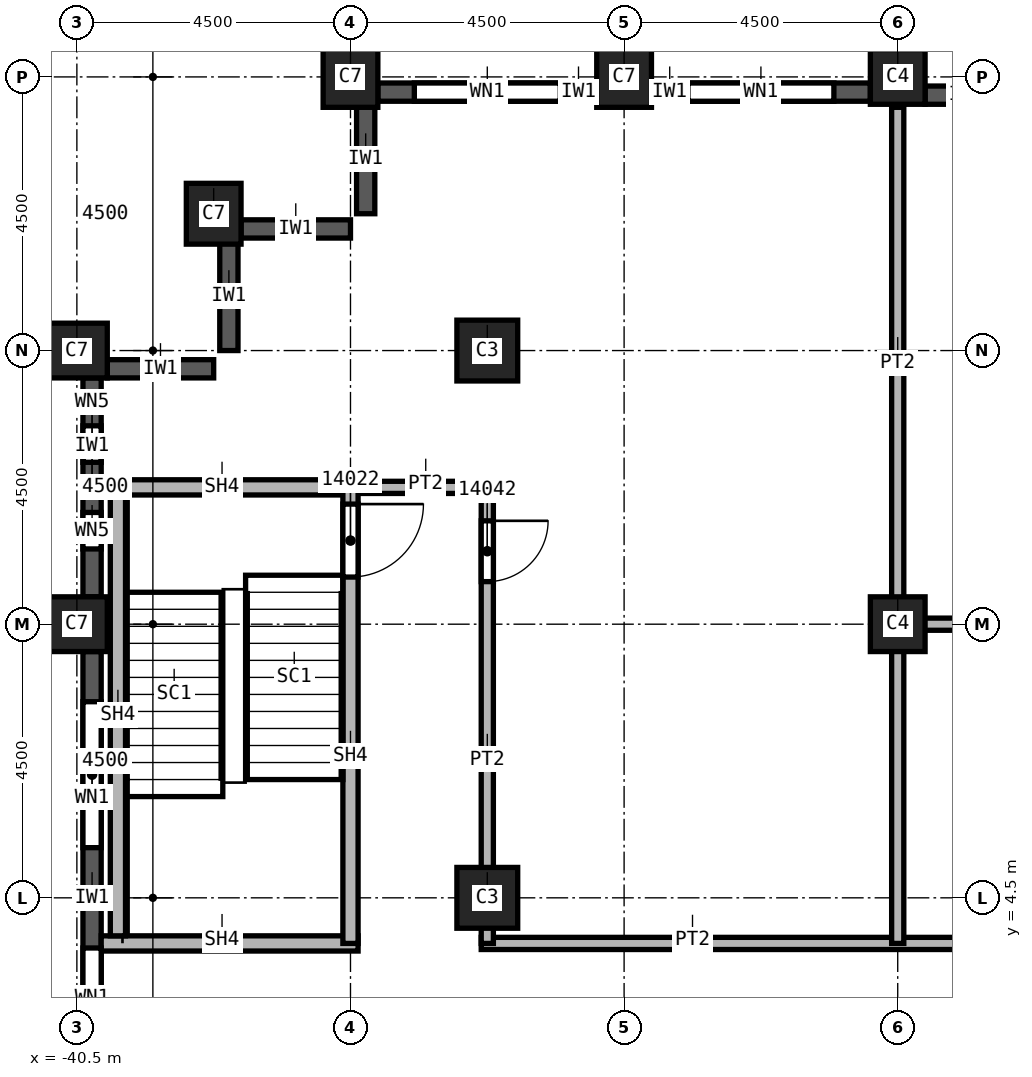
"""IFC4 building model, lengths in metres.
Left out: names, types, materials, properties, quantities, classifications, styles, units other than length and angle.
Written with IfcOpenShell. Run it as: python <this file> out.ifc"""

import sys

from ifc_helpers import new_model, si_unit, direction, frame, frame_2d, origin, origin_2d, place, context, subcontext, project, spatial, rectangle, extrude, element, fill, save


model = new_model("IFC4")
c1 = context("Model", 3, precision=1e-05, world=origin(), true_north=direction((0.0, 1.0)))
c2 = subcontext(c1, "Body", "Model", "MODEL_VIEW")
j1 = project(units=[si_unit("LENGTHUNIT", "METRE"), si_unit("PLANEANGLEUNIT", "RADIAN")], contexts=[c1])
p1 = place(None, origin())
s1 = spatial("IfcSite", under=j1, at=p1, CompositionType="ELEMENT")
p2 = place(p1, origin())
s2 = spatial("IfcBuilding", under=s1, at=p2, CompositionType="ELEMENT")
p3 = place(p2, frame((0.0, 0.0, 224.0)))
s3 = spatial("IfcBuildingStorey", under=s2, at=p3, CompositionType="ELEMENT", Elevation=224.0)
for number, where, z_axis, x_axis in (
    (1, (-40.5, 9.0, 0.0), (0.0, 0.0, 1.0), (0.0, 1.0, 0.0)),
    (2, (-40.5, 13.5, 0.0), (0.0, 0.0, 1.0), (0.0, 1.0, 0.0)),
    (3, (-38.25, 15.75, 0.0), (0.0, 0.0, 1.0), (1.0, 0.0, 0.0)),
    (4, (-31.5, 18.0, 0.0), (0.0, 0.0, 1.0), (1.0, 0.0, 0.0)),
    (5, (-36.0, 18.0, 0.0), (0.0, 0.0, 1.0), (1.0, 0.0, 0.0)),
):
    element("IfcColumn", number, at=place(p3, frame(where, z_axis=z_axis, x_axis=x_axis)), inside=s3, PredefinedType="COLUMN", context=c2, shape_type="SweptSolid", body=[
        extrude(rectangle(XDim=0.9, YDim=1.0, at=origin_2d()), origin(), (0.0, 0.0, 1.0), 3.72),
    ])
for number, where, z_axis, x_axis in (
    (6, (-33.75, 4.5, 0.0), (0.0, 0.0, 1.0), (1.0, 0.0, 0.0)),
    (7, (-33.75, 13.5, 0.0), (0.0, 0.0, 1.0), (1.0, 0.0, 0.0)),
):
    element("IfcColumn", number, at=place(p3, frame(where, z_axis=z_axis, x_axis=x_axis)), inside=s3, PredefinedType="COLUMN", context=c2, shape_type="SweptSolid", body=[
        extrude(rectangle(XDim=1.0, YDim=1.0, at=origin_2d()), origin(), (0.0, 0.0, 1.0), 3.72),
    ])
for number, where, z_axis, x_axis in (
    (8, (-27.0, 9.0, 0.0), (0.0, 0.0, 1.0), (1.0, 0.0, 0.0)),
    (9, (-27.0, 18.0, 0.0), (0.0, 0.0, 1.0), (1.0, 0.0, 0.0)),
):
    element("IfcColumn", number, at=place(p3, frame(where, z_axis=z_axis, x_axis=x_axis)), inside=s3, PredefinedType="COLUMN", context=c2, shape_type="SweptSolid", body=[
        extrude(rectangle(XDim=0.9, YDim=0.9, at=origin_2d()), origin(), (0.0, 0.0, 1.0), 3.72),
    ])
for number, where, z_axis, x_axis in (
    (10, (-35.75, 17.55, 0.0), (0.0, 0.0, 1.0), (0.0, -1.0, 0.0)),
    (11, (-37.8, 15.5, 0.0), (0.0, 0.0, 1.0), (1.0, 0.0, 0.0)),
    (12, (-38.0, 15.3, 0.0), (0.0, 0.0, 1.0), (0.0, -1.0, 0.0)),
):
    element("IfcWall", number, at=place(p3, frame(where, z_axis=z_axis, x_axis=x_axis)), inside=s3, PredefinedType="SOLIDWALL", context=c2, shape_type="SweptSolid", body=[
        extrude(rectangle(XDim=1.8, YDim=0.3, at=frame_2d((0.9, 0.0))), origin(), (0.0, 0.0, 1.0), 3.12),
    ])
p4 = place(p3, frame((-40.0, 13.2, 0.0), z_axis=(0.0, 0.0, 1.0), x_axis=(1.0, 0.0, 0.0)))
e13 = element("IfcWall", 13, at=p4, inside=s3, PredefinedType="SOLIDWALL", context=c2, shape_type="SweptSolid", body=[
    extrude(rectangle(XDim=1.75, YDim=0.3, at=frame_2d((0.875, 0.0))), origin(), (0.0, 0.0, 1.0), 3.12),
])
p5 = place(p3, frame((-25.2, 17.7, 0.0), z_axis=(0.0, 0.0, 1.0), x_axis=(-1.0, 0.0, 0.0)))
e14 = element("IfcWall", 14, at=p5, inside=s3, PredefinedType="SOLIDWALL", context=c2, shape_type="SweptSolid", body=[
    extrude(rectangle(XDim=1.35, YDim=0.3, at=frame_2d((0.675, 0.0))), origin(), (0.0, 0.0, 1.0), 3.12),
])
p6 = place(p3, frame((-27.45, 17.75, 0.0), z_axis=(0.0, 0.0, 1.0), x_axis=(-1.0, 0.0, 0.0)))
e15 = element("IfcWall", 15, at=p6, inside=s3, PredefinedType="SOLIDWALL", context=c2, shape_type="SweptSolid", body=[
    extrude(rectangle(XDim=3.6, YDim=0.3, at=frame_2d((1.8, 0.0))), origin(), (0.0, 0.0, 1.0), 3.12),
])
p7 = place(p6, frame((0.6, 0.0, 0.8)))
e16 = element("IfcOpeningElement", 16, at=p7, cuts=e15, PredefinedType="OPENING", context=c2, shape_type="SweptSolid", body=[
    extrude(rectangle(XDim=2.4, YDim=1.95, at=frame_2d((1.2, 0.975))), frame((0.0, 0.15, 0.0), z_axis=(0.0, -1.0, 0.0), x_axis=(1.0, 0.0, 0.0)), (0.0, 0.0, 1.0), 0.3),
])
p8 = place(p3, frame((-31.95, 17.75, 0.0), z_axis=(0.0, 0.0, 1.0), x_axis=(-1.0, 0.0, 0.0)))
e17 = element("IfcWall", 17, at=p8, inside=s3, PredefinedType="SOLIDWALL", context=c2, shape_type="SweptSolid", body=[
    extrude(rectangle(XDim=3.6, YDim=0.3, at=frame_2d((1.8, 0.0))), origin(), (0.0, 0.0, 1.0), 3.12),
])
p9 = place(p8, frame((0.6, 0.0, 0.8)))
e18 = element("IfcOpeningElement", 18, at=p9, cuts=e17, PredefinedType="OPENING", context=c2, shape_type="SweptSolid", body=[
    extrude(rectangle(XDim=2.4, YDim=1.95, at=frame_2d((1.2, 0.975))), frame((0.0, 0.15, 0.0), z_axis=(0.0, -1.0, 0.0), x_axis=(1.0, 0.0, 0.0)), (0.0, 0.0, 1.0), 0.3),
])
p10 = place(p3, frame((-40.25, 13.05, 0.0), z_axis=(0.0, 0.0, 1.0), x_axis=(0.0, -1.0, 0.0)))
e19 = element("IfcWall", 19, at=p10, inside=s3, PredefinedType="SOLIDWALL", context=c2, shape_type="SweptSolid", body=[
    extrude(rectangle(XDim=3.6, YDim=0.3, at=frame_2d((1.8, 0.0))), origin(), (0.0, 0.0, 1.0), 3.12),
])
p11 = place(p10, frame((0.788, 0.0, 0.8)))
e20 = element("IfcOpeningElement", 20, at=p11, cuts=e19, PredefinedType="OPENING", context=c2, shape_type="SweptSolid", body=[
    extrude(rectangle(XDim=0.6, YDim=1.95, at=frame_2d((0.3, 0.975))), frame((0.0, 0.15, 0.0), z_axis=(0.0, -1.0, 0.0), x_axis=(1.0, 0.0, 0.0)), (0.0, 0.0, 1.0), 0.3),
])
p12 = place(p10, frame((2.212, 0.0, 0.8)))
e21 = element("IfcOpeningElement", 21, at=p12, cuts=e19, PredefinedType="OPENING", context=c2, shape_type="SweptSolid", body=[
    extrude(rectangle(XDim=0.6, YDim=1.95, at=frame_2d((0.3, 0.975))), frame((0.0, 0.15, 0.0), z_axis=(0.0, -1.0, 0.0), x_axis=(1.0, 0.0, 0.0)), (0.0, 0.0, 1.0), 0.3),
])
p13 = place(p3, frame((-40.25, 8.55, 0.0), z_axis=(0.0, 0.0, 1.0), x_axis=(0.0, -1.0, 0.0)))
e22 = element("IfcWall", 22, at=p13, inside=s3, PredefinedType="SOLIDWALL", context=c2, shape_type="SweptSolid", body=[
    extrude(rectangle(XDim=8.1, YDim=0.3, at=frame_2d((4.05, 0.0))), origin(), (0.0, 0.0, 1.0), 3.12),
])
p14 = place(p13, frame((0.825, 0.0, 0.8)))
e23 = element("IfcOpeningElement", 23, at=p14, cuts=e22, PredefinedType="OPENING", context=c2, shape_type="SweptSolid", body=[
    extrude(rectangle(XDim=2.4, YDim=1.95, at=frame_2d((1.2, 0.975))), frame((0.0, 0.15, 0.0), z_axis=(0.0, -1.0, 0.0), x_axis=(1.0, 0.0, 0.0)), (0.0, 0.0, 1.0), 0.3),
])
p15 = place(p13, frame((4.875, 0.0, 0.8)))
e24 = element("IfcOpeningElement", 24, at=p15, cuts=e22, PredefinedType="OPENING", context=c2, shape_type="SweptSolid", body=[
    extrude(rectangle(XDim=2.4, YDim=1.95, at=frame_2d((1.2, 0.975))), frame((0.0, 0.15, 0.0), z_axis=(0.0, -1.0, 0.0), x_axis=(1.0, 0.0, 0.0)), (0.0, 0.0, 1.0), 0.3),
])
p16 = place(p3, frame((-36.0, 11.25, 0.0), z_axis=(0.0, 0.0, 1.0), x_axis=(1.0, 0.0, 0.0)))
e25 = element("IfcWall", 25, at=p16, inside=s3, PredefinedType="PARTITIONING", context=c2, shape_type="SweptSolid", body=[
    extrude(rectangle(XDim=2.35, YDim=0.2, at=frame_2d((1.175, 0.0))), origin(), (0.0, 0.0, 1.0), 3.72),
])
p17 = place(p3, frame((-33.85, 3.75, 0.0), z_axis=(0.0, 0.0, 1.0), x_axis=(1.0, 0.0, 0.0)))
e26 = element("IfcWall", 26, at=p17, inside=s3, PredefinedType="PARTITIONING", context=c2, shape_type="SweptSolid", body=[
    extrude(rectangle(XDim=13.95, YDim=0.2, at=frame_2d((6.975, 0.0))), origin(), (0.0, 0.0, 1.0), 3.72),
])
p18 = place(p17, frame((9.85, 0.0, 0.0)))
e27 = element("IfcOpeningElement", 27, at=p18, cuts=e26, PredefinedType="OPENING", context=c2, shape_type="SweptSolid", body=[
    extrude(rectangle(XDim=1.0, YDim=2.1, at=frame_2d((0.5, 1.05))), frame((0.0, 0.1, 0.0), z_axis=(0.0, -1.0, 0.0), x_axis=(1.0, 0.0, 0.0)), (0.0, 0.0, 1.0), 0.2),
])
p19 = place(p3, frame((-33.75, 11.25, 0.0), z_axis=(0.0, 0.0, 1.0), x_axis=(0.0, -1.0, 0.0)))
e28 = element("IfcWall", 28, at=p19, inside=s3, PredefinedType="PARTITIONING", context=c2, shape_type="SweptSolid", body=[
    extrude(rectangle(XDim=7.5, YDim=0.2, at=frame_2d((3.75, 0.0))), origin(), (0.0, 0.0, 1.0), 3.72),
])
p20 = place(p19, frame((0.55, 0.0, 0.0)))
e29 = element("IfcOpeningElement", 29, at=p20, cuts=e28, PredefinedType="OPENING", context=c2, shape_type="SweptSolid", body=[
    extrude(rectangle(XDim=1.0, YDim=2.1, at=frame_2d((0.5, 1.05))), frame((0.0, 0.1, 0.0), z_axis=(0.0, -1.0, 0.0), x_axis=(1.0, 0.0, 0.0)), (0.0, 0.0, 1.0), 0.2),
])
p21 = place(p3, frame((-27.1, 9.0, 0.0), z_axis=(0.0, 0.0, 1.0), x_axis=(1.0, 0.0, 0.0)))
e30 = element("IfcWall", 30, at=p21, inside=s3, PredefinedType="PARTITIONING", context=c2, shape_type="SweptSolid", body=[
    extrude(rectangle(XDim=7.2, YDim=0.2, at=frame_2d((3.6, 0.0))), origin(), (0.0, 0.0, 1.0), 3.72),
])
p22 = place(p3, frame((-27.0, 3.75, 0.0), z_axis=(0.0, 0.0, 1.0), x_axis=(0.0, 1.0, 0.0)))
e31 = element("IfcWall", 31, at=p22, inside=s3, PredefinedType="PARTITIONING", context=c2, shape_type="SweptSolid", body=[
    extrude(rectangle(XDim=13.75, YDim=0.2, at=frame_2d((6.875, 0.0))), origin(), (0.0, 0.0, 1.0), 3.72),
])
p23 = place(p3, frame((-40.1, 3.75, 0.0), z_axis=(0.0, 0.0, 1.0), x_axis=(1.0, 0.0, 0.0)))
e32 = element("IfcWall", 32, at=p23, inside=s3, PredefinedType="SOLIDWALL", context=c2, shape_type="SweptSolid", body=[
    extrude(rectangle(XDim=4.225, YDim=0.25, at=frame_2d((2.113, 0.0))), origin(), (0.0, 0.0, 1.0), 3.72),
])
p24 = place(p3, frame((-40.1, 11.25, 0.0), z_axis=(0.0, 0.0, 1.0), x_axis=(1.0, 0.0, 0.0)))
e33 = element("IfcWall", 33, at=p24, inside=s3, PredefinedType="SOLIDWALL", context=c2, shape_type="SweptSolid", body=[
    extrude(rectangle(XDim=4.1, YDim=0.25, at=frame_2d((2.05, 0.0))), origin(), (0.0, 0.0, 1.0), 3.72),
])
p25 = place(p3, frame((-36.0, 11.375, 0.0), z_axis=(0.0, 0.0, 1.0), x_axis=(0.0, -1.0, 0.0)))
e34 = element("IfcWall", 34, at=p25, inside=s3, PredefinedType="SOLIDWALL", context=c2, shape_type="SweptSolid", body=[
    extrude(rectangle(XDim=7.625, YDim=0.25, at=frame_2d((3.812, 0.0))), origin(), (0.0, 0.0, 1.0), 3.72),
])
p26 = place(p25, frame((0.4, 0.0, 0.0)))
e35 = element("IfcOpeningElement", 35, at=p26, cuts=e34, PredefinedType="OPENING", context=c2, shape_type="SweptSolid", body=[
    extrude(rectangle(XDim=1.2, YDim=2.1, at=frame_2d((0.6, 1.05))), frame((0.0, 0.125, 0.0), z_axis=(0.0, -1.0, 0.0), x_axis=(1.0, 0.0, 0.0)), (0.0, 0.0, 1.0), 0.25),
])
p27 = place(p3, frame((-39.825, 3.875, 0.0), z_axis=(0.0, 0.0, 1.0), x_axis=(0.0, 1.0, 0.0)))
e36 = element("IfcWall", 36, at=p27, inside=s3, PredefinedType="SOLIDWALL", context=c2, shape_type="SweptSolid", body=[
    extrude(rectangle(XDim=7.25, YDim=0.25, at=frame_2d((3.625, 0.0))), origin(), (0.0, 0.0, 1.0), 3.72),
])
p28 = place(p7, origin())
e37 = element("IfcWindow", 37, at=p28, inside=s3, PartitioningType="SINGLE_PANEL", PredefinedType="WINDOW", context=c2, shape_type="SweptSolid", body=[
    extrude(rectangle(XDim=2.4, YDim=1.95, at=frame_2d((1.2, 0.975))), frame((0.0, 0.03, 0.0), z_axis=(0.0, -1.0, 0.0), x_axis=(1.0, 0.0, 0.0)), (0.0, 0.0, 1.0), 0.06),
])
fill(e16, e37)
p29 = place(p9, origin())
e38 = element("IfcWindow", 38, at=p29, inside=s3, PartitioningType="SINGLE_PANEL", PredefinedType="WINDOW", context=c2, shape_type="SweptSolid", body=[
    extrude(rectangle(XDim=2.4, YDim=1.95, at=frame_2d((1.2, 0.975))), frame((0.0, 0.03, 0.0), z_axis=(0.0, -1.0, 0.0), x_axis=(1.0, 0.0, 0.0)), (0.0, 0.0, 1.0), 0.06),
])
fill(e18, e38)
p30 = place(p14, origin())
e39 = element("IfcWindow", 39, at=p30, inside=s3, PartitioningType="SINGLE_PANEL", PredefinedType="WINDOW", context=c2, shape_type="SweptSolid", body=[
    extrude(rectangle(XDim=2.4, YDim=1.95, at=frame_2d((1.2, 0.975))), frame((0.0, 0.03, 0.0), z_axis=(0.0, -1.0, 0.0), x_axis=(1.0, 0.0, 0.0)), (0.0, 0.0, 1.0), 0.06),
])
fill(e23, e39)
p31 = place(p15, origin())
e40 = element("IfcWindow", 40, at=p31, inside=s3, PartitioningType="SINGLE_PANEL", PredefinedType="WINDOW", context=c2, shape_type="SweptSolid", body=[
    extrude(rectangle(XDim=2.4, YDim=1.95, at=frame_2d((1.2, 0.975))), frame((0.0, 0.03, 0.0), z_axis=(0.0, -1.0, 0.0), x_axis=(1.0, 0.0, 0.0)), (0.0, 0.0, 1.0), 0.06),
])
fill(e24, e40)
p32 = place(p26, origin())
e41 = element("IfcDoor", 41, at=p32, inside=s3, OperationType="SINGLE_SWING_LEFT", PredefinedType="DOOR", context=c2, shape_type="SweptSolid", body=[
    extrude(rectangle(XDim=1.2, YDim=2.1, at=frame_2d((0.6, 1.05))), frame((0.0, 0.025, 0.0), z_axis=(0.0, -1.0, 0.0), x_axis=(1.0, 0.0, 0.0)), (0.0, 0.0, 1.0), 0.05),
])
fill(e35, e41)
p33 = place(p20, origin())
e42 = element("IfcDoor", 42, at=p33, inside=s3, OperationType="SINGLE_SWING_LEFT", PredefinedType="DOOR", context=c2, shape_type="SweptSolid", body=[
    extrude(rectangle(XDim=1.0, YDim=2.1, at=frame_2d((0.5, 1.05))), frame((0.0, 0.025, 0.0), z_axis=(0.0, -1.0, 0.0), x_axis=(1.0, 0.0, 0.0)), (0.0, 0.0, 1.0), 0.05),
])
fill(e29, e42)
p34 = place(p11, origin())
e43 = element("IfcWindow", 43, at=p34, inside=s3, PartitioningType="SINGLE_PANEL", PredefinedType="WINDOW", context=c2, shape_type="SweptSolid", body=[
    extrude(rectangle(XDim=0.6, YDim=1.95, at=frame_2d((0.3, 0.975))), frame((0.0, 0.03, 0.0), z_axis=(0.0, -1.0, 0.0), x_axis=(1.0, 0.0, 0.0)), (0.0, 0.0, 1.0), 0.06),
])
fill(e20, e43)
p35 = place(p12, origin())
e44 = element("IfcWindow", 44, at=p35, inside=s3, PartitioningType="SINGLE_PANEL", PredefinedType="WINDOW", context=c2, shape_type="SweptSolid", body=[
    extrude(rectangle(XDim=0.6, YDim=1.95, at=frame_2d((0.3, 0.975))), frame((0.0, 0.03, 0.0), z_axis=(0.0, -1.0, 0.0), x_axis=(1.0, 0.0, 0.0)), (0.0, 0.0, 1.0), 0.06),
])
fill(e21, e44)
save(model, sys.argv[1])
